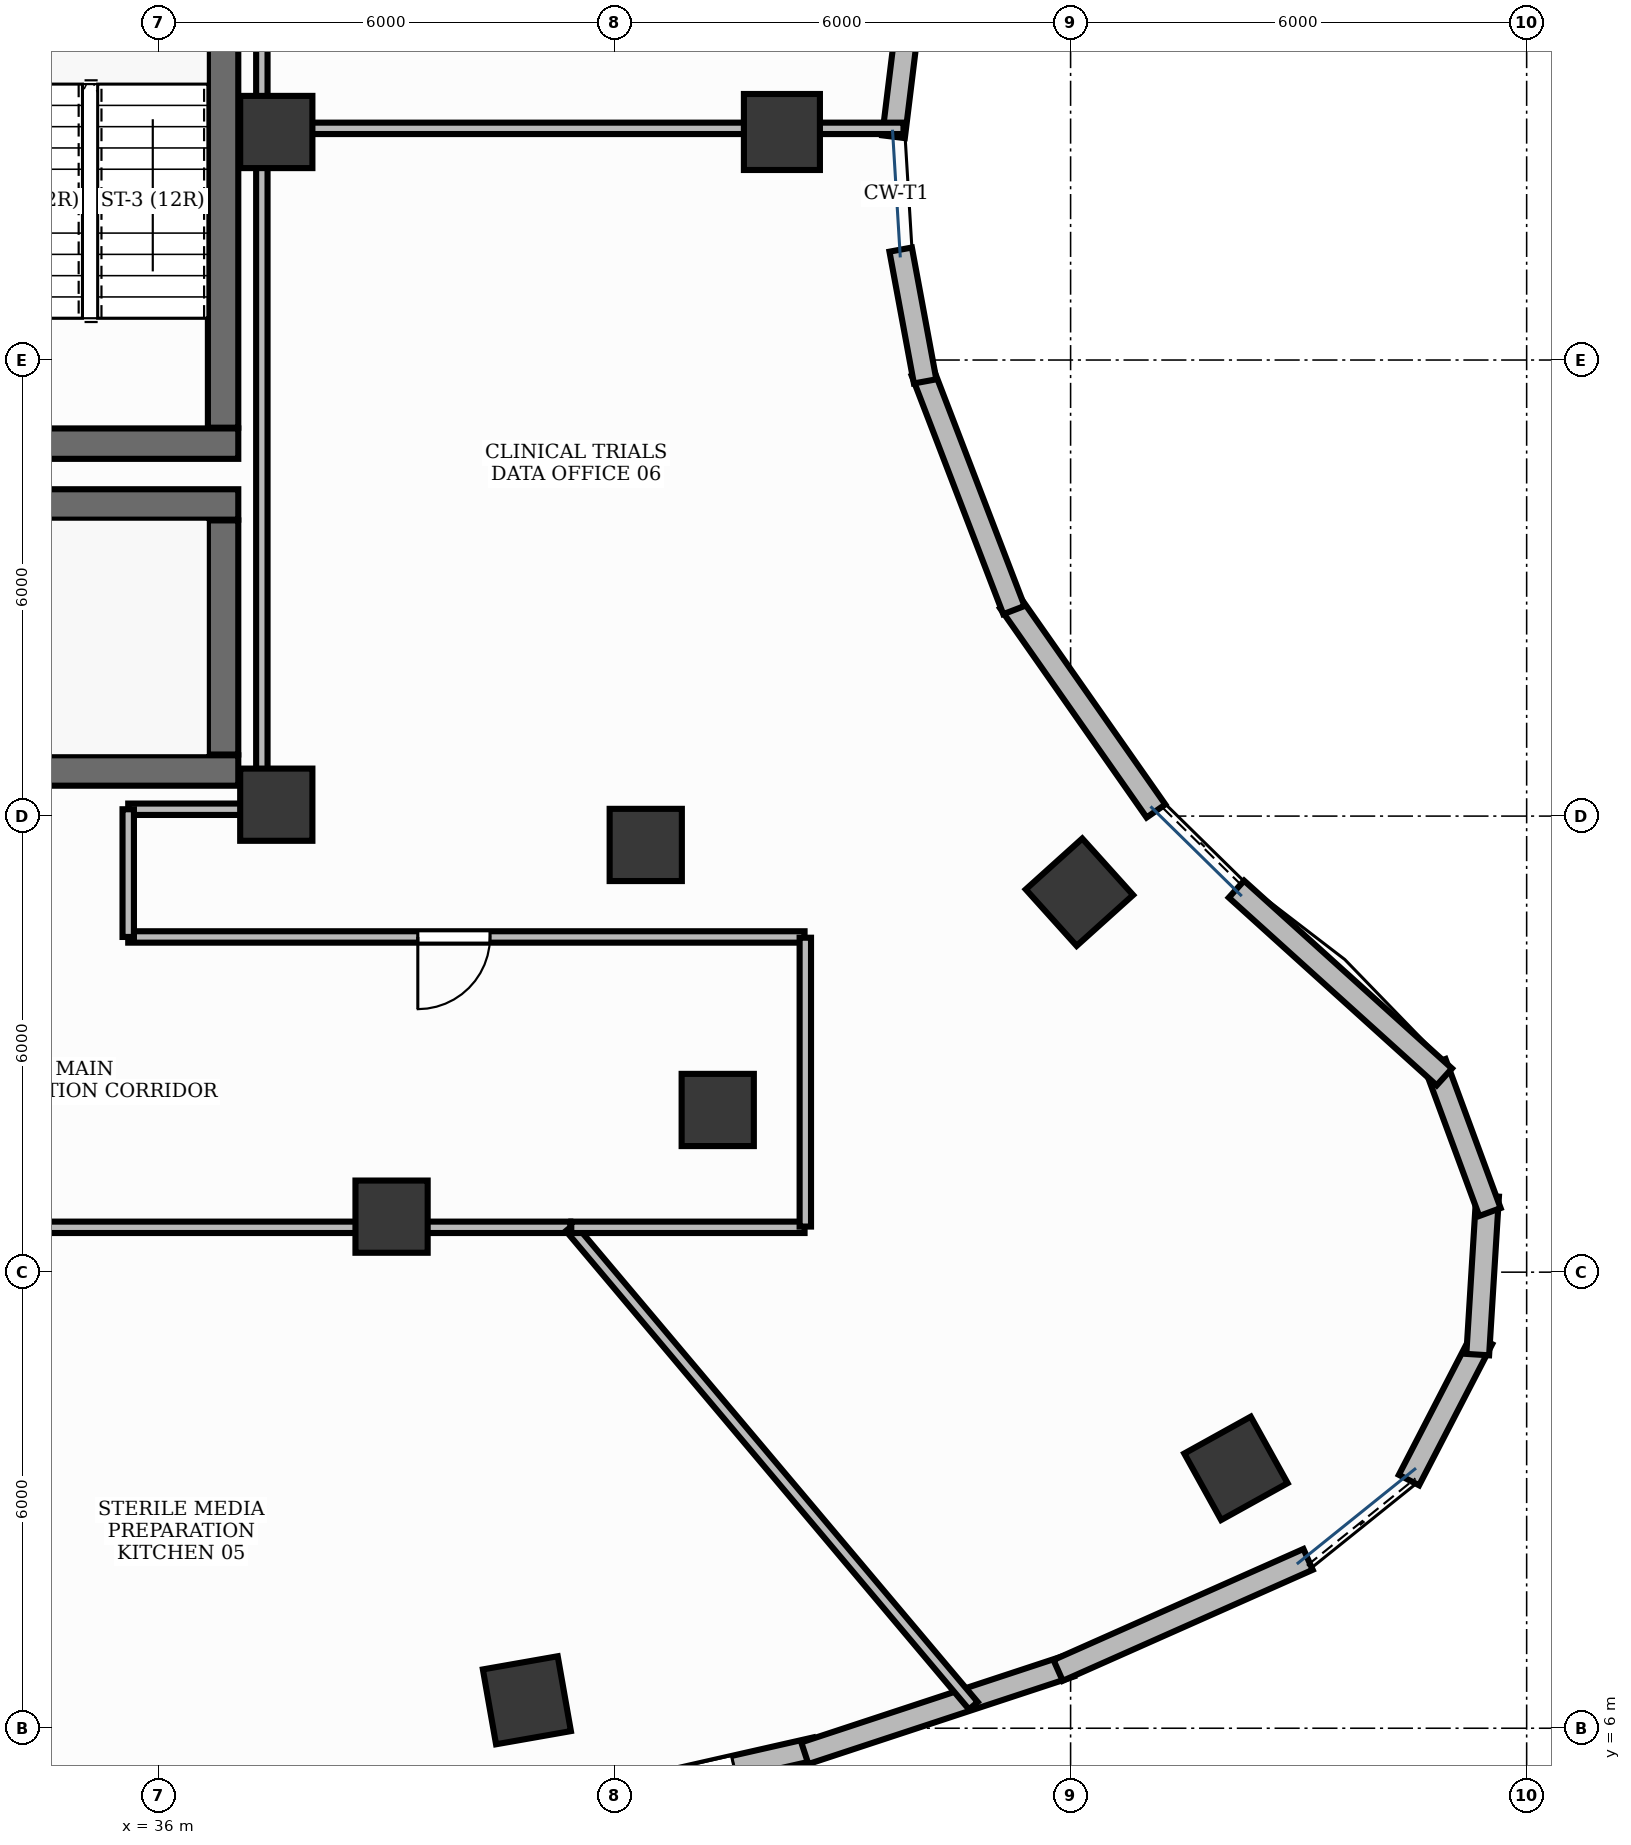
"""IFC4 building model, lengths in metres.
Left out: names, types, materials, properties, quantities, classifications, styles, units other than length and angle.
Written with IfcOpenShell. Run it as: python <this file> out.ifc"""

import sys

from ifc_helpers import new_model, si_unit, direction, frame, frame_2d, origin, origin_2d, place, context, subcontext, project, spatial, rectangle, extrude, element, fill, save


model = new_model("IFC4")
c1 = context("Model", 3, precision=1e-05, world=origin(), true_north=direction((0.0, 1.0)))
c2 = subcontext(c1, "Body", "Model", "MODEL_VIEW")
j1 = project(units=[si_unit("LENGTHUNIT", "METRE"), si_unit("PLANEANGLEUNIT", "RADIAN")], contexts=[c1])
p1 = place(None, origin())
s1 = spatial("IfcSite", under=j1, at=p1, CompositionType="ELEMENT")
p2 = place(p1, origin())
s2 = spatial("IfcBuilding", under=s1, at=p2, CompositionType="ELEMENT")
p3 = place(p2, frame((0.0, 0.0, 222.6)))
s3 = spatial("IfcBuildingStorey", under=s2, at=p3, CompositionType="ELEMENT", Elevation=222.6)
p4 = place(p3, frame((28.852, 18.6, 0.0), z_axis=(0.0, 0.0, 1.0), x_axis=(1.0, 0.0, 0.0)))
e1 = element("IfcWall", 1, at=p4, inside=s3, PredefinedType="SHEAR", context=c2, shape_type="SweptSolid", body=[
    extrude(rectangle(XDim=8.198, YDim=0.4, at=frame_2d((4.099, 0.0))), origin(), (0.0, 0.0, 1.0), 3.9),
])
p5 = place(p3, frame((28.4, 22.1, 0.0), z_axis=(0.0, 0.0, 1.0), x_axis=(1.0, 0.0, 0.0)))
e2 = element("IfcWall", 2, at=p5, inside=s3, PredefinedType="SHEAR", context=c2, shape_type="SweptSolid", body=[
    extrude(rectangle(XDim=8.65, YDim=0.4, at=frame_2d((4.325, 0.0))), origin(), (0.0, 0.0, 1.0), 3.9),
])
p6 = place(p3, frame((36.85, 18.81, 0.0), z_axis=(0.0, 0.0, 1.0), x_axis=(0.0, 1.0, 0.0)))
e3 = element("IfcWall", 3, at=p6, inside=s3, PredefinedType="SHEAR", context=c2, shape_type="SweptSolid", body=[
    extrude(rectangle(XDim=3.08, YDim=0.4, at=frame_2d((1.54, 0.0))), origin(), (0.0, 0.0, 1.0), 3.9),
])
p7 = place(p3, frame((33.15, 22.9, 0.0), z_axis=(0.0, 0.0, 1.0), x_axis=(1.0, 0.0, 0.0)))
e4 = element("IfcWall", 4, at=p7, inside=s3, PredefinedType="SHEAR", context=c2, shape_type="SweptSolid", body=[
    extrude(rectangle(XDim=3.9, YDim=0.4, at=frame_2d((1.95, 0.0))), origin(), (0.0, 0.0, 1.0), 3.9),
])
p8 = place(p3, frame((36.85, 23.11, 0.0), z_axis=(0.0, 0.0, 1.0), x_axis=(0.0, 1.0, 0.0)))
e5 = element("IfcWall", 5, at=p8, inside=s3, PredefinedType="SHEAR", context=c2, shape_type="SweptSolid", body=[
    extrude(rectangle(XDim=7.78, YDim=0.4, at=frame_2d((3.89, 0.0))), origin(), (0.0, 0.0, 1.0), 3.9),
])
for number, where, z_axis, x_axis in (
    (6, (37.55, 18.15, -0.0), (0.0, 0.0, 1.0), (1.0, 0.0, 0.0)),
    (7, (37.55, 27.0, -0.0), (0.0, 0.0, 1.0), (1.0, 0.0, 0.0)),
):
    element("IfcColumn", number, at=place(p3, frame(where, z_axis=z_axis, x_axis=x_axis)), inside=s3, PredefinedType="PILASTER", context=c2, shape_type="SweptSolid", body=[
        extrude(rectangle(XDim=0.95, YDim=0.95, at=origin_2d()), origin(), (0.0, 0.0, 1.0), 3.901),
    ])
p9 = place(p3, frame((40.847, 6.368, -0.0), z_axis=(0.0, 0.0, 1.0), x_axis=(0.984868307662, 0.173304404339, 0.0)))
e8 = element("IfcColumn", 8, at=p9, inside=s3, PredefinedType="COLUMN", context=c2, shape_type="SweptSolid", body=[
    extrude(rectangle(XDim=1.0, YDim=1.0, at=origin_2d()), origin(), (0.0, 0.0, 1.0), 3.901),
])
p10 = place(p3, frame((39.067, 12.73, -0.0), z_axis=(0.0, 0.0, 1.0), x_axis=(1.0, 0.0, 0.0)))
e9 = element("IfcColumn", 9, at=p10, inside=s3, PredefinedType="COLUMN", context=c2, shape_type="SweptSolid", body=[
    extrude(rectangle(XDim=0.95, YDim=0.95, at=origin_2d()), origin(), (0.0, 0.0, 1.0), 3.901),
])
p11 = place(p3, frame((50.176, 9.419, -0.0), z_axis=(0.0, 0.0, 1.0), x_axis=(0.874535078577, 0.484962262797, 0.0)))
e10 = element("IfcColumn", 10, at=p11, inside=s3, PredefinedType="COLUMN", context=c2, shape_type="SweptSolid", body=[
    extrude(rectangle(XDim=1.0, YDim=1.0, at=origin_2d()), origin(), (0.0, 0.0, 1.0), 3.901),
])
p12 = place(p3, frame((43.358, 14.134, -0.0), z_axis=(0.0, 0.0, 1.0), x_axis=(1.0, 0.0, 0.0)))
e11 = element("IfcColumn", 11, at=p12, inside=s3, PredefinedType="COLUMN", context=c2, shape_type="SweptSolid", body=[
    extrude(rectangle(XDim=0.95, YDim=0.95, at=origin_2d()), origin(), (0.0, 0.0, 1.0), 3.901),
])
p13 = place(p3, frame((48.116, 16.999, -0.0), z_axis=(0.0, 0.0, 1.0), x_axis=(-0.669130606359, 0.743144825477, 0.0)))
e12 = element("IfcColumn", 12, at=p13, inside=s3, PredefinedType="COLUMN", context=c2, shape_type="SweptSolid", body=[
    extrude(rectangle(XDim=1.0, YDim=1.0, at=origin_2d()), origin(), (0.0, 0.0, 1.0), 3.901),
])
p14 = place(p3, frame((42.411, 17.62, -0.0), z_axis=(0.0, 0.0, 1.0), x_axis=(1.0, 0.0, 0.0)))
e13 = element("IfcColumn", 13, at=p14, inside=s3, PredefinedType="COLUMN", context=c2, shape_type="SweptSolid", body=[
    extrude(rectangle(XDim=0.95, YDim=0.95, at=origin_2d()), origin(), (0.0, 0.0, 1.0), 3.901),
])
p15 = place(p3, frame((44.202, 27.0, -0.0), z_axis=(0.0, 0.0, 1.0), x_axis=(0.0, 1.0, 0.0)))
e14 = element("IfcColumn", 14, at=p15, inside=s3, PredefinedType="COLUMN", context=c2, shape_type="SweptSolid", body=[
    extrude(rectangle(XDim=1.0, YDim=1.0, at=origin_2d()), origin(), (0.0, 0.0, 1.0), 3.901),
])
p16 = place(p3, frame((41.036, 4.914, 0.0), z_axis=(0.0, 0.0, 1.0), x_axis=(0.975237678872, 0.221159376263, 0.0)))
e15 = element("IfcWall", 15, at=p16, inside=s3, PredefinedType="STANDARD", context=c2, shape_type="SweptSolid", body=[
    extrude(rectangle(XDim=3.703, YDim=0.3, at=frame_2d((1.851, 0.0))), origin(), (0.0, 0.0, 1.0), 3.9),
])
p17 = place(p16, frame((1.101, 0.0, 0.95)))
e16 = element("IfcOpeningElement", 16, at=p17, cuts=e15, PredefinedType="OPENING", context=c2, shape_type="SweptSolid", body=[
    extrude(rectangle(XDim=1.5, YDim=1.8, at=frame_2d((0.75, 0.9))), frame((0.0, 0.165, 0.0), z_axis=(0.0, -1.0, 0.0), x_axis=(1.0, 0.0, 0.0)), (0.0, 0.0, 1.0), 0.33),
])
p18 = place(p3, frame((44.504, 5.671, 0.0), z_axis=(0.0, 0.0, 1.0), x_axis=(0.94972655205, 0.313080622734, 0.0)))
e17 = element("IfcWall", 17, at=p18, inside=s3, PredefinedType="STANDARD", context=c2, shape_type="SweptSolid", body=[
    extrude(rectangle(XDim=3.679, YDim=0.3, at=frame_2d((1.84, 0.0))), origin(), (0.0, 0.0, 1.0), 3.9),
])
p19 = place(p3, frame((47.836, 6.761, 0.0), z_axis=(0.0, 0.0, 1.0), x_axis=(0.913940198441, 0.405848880341, 0.0)))
e18 = element("IfcWall", 18, at=p19, inside=s3, PredefinedType="STANDARD", context=c2, shape_type="SweptSolid", body=[
    extrude(rectangle(XDim=3.598, YDim=0.3, at=frame_2d((1.799, 0.0))), origin(), (0.0, 0.0, 1.0), 3.9),
])
p20 = place(p3, frame((52.452, 9.265, 0.0), z_axis=(0.0, 0.0, 1.0), x_axis=(0.459683297138, 0.888082916361, 0.0)))
e19 = element("IfcWall", 19, at=p20, inside=s3, PredefinedType="STANDARD", context=c2, shape_type="SweptSolid", body=[
    extrude(rectangle(XDim=2.092, YDim=0.3, at=frame_2d((1.046, 0.0))), origin(), (0.0, 0.0, 1.0), 3.9),
])
for number, where, z_axis, x_axis in (
    (20, (53.356, 10.915, 0.0), (0.0, 0.0, 1.0), (0.062, 0.998, 0.0)),
    (21, (53.517, 12.791, 0.0), (0.0, 0.0, 1.0), (-0.346, 0.938, 0.0)),
):
    element("IfcWall", number, at=place(p3, frame(where, z_axis=z_axis, x_axis=x_axis)), inside=s3, PredefinedType="STANDARD", context=c2, shape_type="SweptSolid", body=[
        extrude(rectangle(XDim=2.091, YDim=0.3, at=frame_2d((1.046, 0.0))), origin(), (0.0, 0.0, 1.0), 3.9),
    ])
p21 = place(p3, frame((52.917, 14.569, 0.0), z_axis=(0.0, 0.0, 1.0), x_axis=(-0.742037796493, 0.670358045059, 0.0)))
e22 = element("IfcWall", 22, at=p21, inside=s3, PredefinedType="STANDARD", context=c2, shape_type="SweptSolid", body=[
    extrude(rectangle(XDim=3.685, YDim=0.3, at=frame_2d((1.843, 0.0))), origin(), (0.0, 0.0, 1.0), 3.9),
])
p22 = place(p3, frame((49.123, 18.067, 0.0), z_axis=(0.0, 0.0, 1.0), x_axis=(-0.573598849051, 0.819136350291, 0.0)))
e23 = element("IfcWall", 23, at=p22, inside=s3, PredefinedType="STANDARD", context=c2, shape_type="SweptSolid", body=[
    extrude(rectangle(XDim=3.361, YDim=0.3, at=frame_2d((1.68, 0.0))), origin(), (0.0, 0.0, 1.0), 3.9),
])
p23 = place(p3, frame((47.254, 20.71, 0.0), z_axis=(0.0, 0.0, 1.0), x_axis=(-0.358365624917, 0.933581318835, 0.0)))
e24 = element("IfcWall", 24, at=p23, inside=s3, PredefinedType="STANDARD", context=c2, shape_type="SweptSolid", body=[
    extrude(rectangle(XDim=3.361, YDim=0.3, at=frame_2d((1.68, 0.0))), origin(), (0.0, 0.0, 1.0), 3.9),
])
p24 = place(p3, frame((46.086, 23.719, 0.0), z_axis=(0.0, 0.0, 1.0), x_axis=(-0.182198328631, 0.983261800867, 0.0)))
e25 = element("IfcWall", 25, at=p24, inside=s3, PredefinedType="STANDARD", context=c2, shape_type="SweptSolid", body=[
    extrude(rectangle(XDim=1.763, YDim=0.3, at=frame_2d((0.882, 0.0))), origin(), (0.0, 0.0, 1.0), 3.9),
])
p25 = place(p3, frame((45.67, 26.938, 0.0), z_axis=(0.0, 0.0, 1.0), x_axis=(0.121834797873, 0.992550392689, 0.0)))
e26 = element("IfcWall", 26, at=p25, inside=s3, PredefinedType="STANDARD", context=c2, shape_type="SweptSolid", body=[
    extrude(rectangle(XDim=3.361, YDim=0.3, at=frame_2d((1.68, 0.0))), origin(), (0.0, 0.0, 1.0), 3.9),
])
p26 = place(p3, frame((29.612, 12.59, 0.0), z_axis=(0.0, 0.0, 1.0), x_axis=(1.0, 0.0, 0.0)))
e27 = element("IfcWall", 27, at=p26, inside=s3, PredefinedType="PARTITIONING", context=c2, shape_type="SweptSolid", body=[
    extrude(rectangle(XDim=11.806, YDim=0.15, at=frame_2d((5.903, 0.0))), origin(), (0.0, 0.0, 1.0), 2.91),
])
p27 = place(p26, frame((0.24, 0.0, 0.0)))
e28 = element("IfcOpeningElement", 28, at=p27, cuts=e27, PredefinedType="OPENING", context=c2, shape_type="SweptSolid", body=[
    extrude(rectangle(XDim=0.95, YDim=2.15, at=frame_2d((0.475, 1.075))), frame((0.0, 0.09, 0.0), z_axis=(0.0, -1.0, 0.0), x_axis=(1.0, 0.0, 0.0)), (0.0, 0.0, 1.0), 0.18),
])
p28 = place(p3, frame((44.5, 16.41, 0.0), z_axis=(0.0, 0.0, 1.0), x_axis=(-1.0, 0.0, 0.0)))
e29 = element("IfcWall", 29, at=p28, inside=s3, PredefinedType="PARTITIONING", context=c2, shape_type="SweptSolid", body=[
    extrude(rectangle(XDim=8.898, YDim=0.15, at=frame_2d((4.449, 0.0))), origin(), (0.0, 0.0, 1.0), 2.91),
])
p29 = place(p28, frame((4.138, 0.0, 0.0)))
e30 = element("IfcOpeningElement", 30, at=p29, cuts=e29, PredefinedType="OPENING", context=c2, shape_type="SweptSolid", body=[
    extrude(rectangle(XDim=0.95, YDim=2.15, at=frame_2d((0.475, 1.075))), frame((0.0, 0.09, 0.0), z_axis=(0.0, -1.0, 0.0), x_axis=(1.0, 0.0, 0.0)), (0.0, 0.0, 1.0), 0.18),
])
p30 = place(p3, frame((41.418, 12.59, 0.0), z_axis=(0.0, 0.0, 1.0), x_axis=(0.644315695233, -0.764759625554, 0.0)))
e31 = element("IfcWall", 31, at=p30, inside=s3, PredefinedType="PARTITIONING", context=c2, shape_type="SweptSolid", body=[
    extrude(rectangle(XDim=8.23, YDim=0.15, at=frame_2d((4.115, 0.0))), origin(), (0.0, 0.0, 1.0), 2.91),
])
p31 = place(p3, frame((35.602, 18.09, 0.0), z_axis=(0.0, 0.0, 1.0), x_axis=(1.0, 0.0, 0.0)))
e32 = element("IfcWall", 32, at=p31, inside=s3, PredefinedType="PARTITIONING", context=c2, shape_type="SweptSolid", body=[
    extrude(rectangle(XDim=1.748, YDim=0.15, at=frame_2d((0.874, 0.0))), origin(), (0.0, 0.0, 1.0), 2.91),
])
p32 = place(p3, frame((37.36, 18.1, 0.0), z_axis=(0.0, 0.0, 1.0), x_axis=(0.0, 1.0, 0.0)))
e33 = element("IfcWall", 33, at=p32, inside=s3, PredefinedType="PARTITIONING", context=c2, shape_type="SweptSolid", body=[
    extrude(rectangle(XDim=8.948, YDim=0.15, at=frame_2d((4.474, 0.0))), origin(), (0.0, 0.0, 1.0), 2.91),
])
p33 = place(p3, frame((37.36, 27.048, 0.0), z_axis=(0.0, 0.0, 1.0), x_axis=(1.0, 0.0, 0.0)))
e34 = element("IfcWall", 34, at=p33, inside=s3, PredefinedType="PARTITIONING", context=c2, shape_type="SweptSolid", body=[
    extrude(rectangle(XDim=8.441, YDim=0.15, at=frame_2d((4.221, 0.0))), origin(), (0.0, 0.0, 1.0), 2.91),
])
p34 = place(p3, frame((41.431, 12.59, 0.0), z_axis=(0.0, 0.0, 1.0), x_axis=(1.0, 0.0, 0.0)))
e35 = element("IfcWall", 35, at=p34, inside=s3, PredefinedType="PARTITIONING", context=c2, shape_type="SweptSolid", body=[
    extrude(rectangle(XDim=3.069, YDim=0.15, at=frame_2d((1.535, 0.0))), origin(), (0.0, 0.0, 1.0), 2.91),
])
p35 = place(p3, frame((44.51, 12.6, 0.0), z_axis=(0.0, 0.0, 1.0), x_axis=(0.0, 1.0, 0.0)))
e36 = element("IfcWall", 36, at=p35, inside=s3, PredefinedType="PARTITIONING", context=c2, shape_type="SweptSolid", body=[
    extrude(rectangle(XDim=3.8, YDim=0.15, at=frame_2d((1.9, 0.0))), origin(), (0.0, 0.0, 1.0), 2.91),
])
p36 = place(p3, frame((35.602, 16.41, 0.0), z_axis=(0.0, 0.0, 1.0), x_axis=(0.0, 1.0, 0.0)))
e37 = element("IfcWall", 37, at=p36, inside=s3, PredefinedType="PARTITIONING", context=c2, shape_type="SweptSolid", body=[
    extrude(rectangle(XDim=1.68, YDim=0.15, at=frame_2d((0.84, 0.0))), origin(), (0.0, 0.0, 1.0), 2.91),
])
p37 = place(p3, frame((37.36, 27.058, 0.0), z_axis=(0.0, 0.0, 1.0), x_axis=(0.0, 1.0, 0.0)))
e38 = element("IfcWall", 38, at=p37, inside=s3, PredefinedType="PARTITIONING", context=c2, shape_type="SweptSolid", body=[
    extrude(rectangle(XDim=8.842, YDim=0.15, at=frame_2d((4.421, 0.0))), origin(), (0.0, 0.0, 1.0), 2.91),
])
p38 = place(p17, origin())
e39 = element("IfcWindow", 39, at=p38, inside=s3, PartitioningType="DOUBLE_PANEL_VERTICAL", PredefinedType="WINDOW", context=c2, shape_type="SweptSolid", body=[
    extrude(rectangle(XDim=1.5, YDim=1.8, at=frame_2d((0.75, 0.9))), frame((0.0, 0.03, 0.0), z_axis=(0.0, -1.0, 0.0), x_axis=(1.0, 0.0, 0.0)), (0.0, 0.0, 1.0), 0.06),
])
fill(e16, e39)
p39 = place(p29, origin())
e40 = element("IfcDoor", 40, at=p39, inside=s3, OperationType="SINGLE_SWING_RIGHT", PredefinedType="DOOR", context=c2, shape_type="SweptSolid", body=[
    extrude(rectangle(XDim=0.95, YDim=2.15, at=frame_2d((0.475, 1.075))), frame((0.0, 0.025, 0.0), z_axis=(0.0, -1.0, 0.0), x_axis=(1.0, 0.0, 0.0)), (0.0, 0.0, 1.0), 0.05),
])
fill(e30, e40)
save(model, sys.argv[1])
